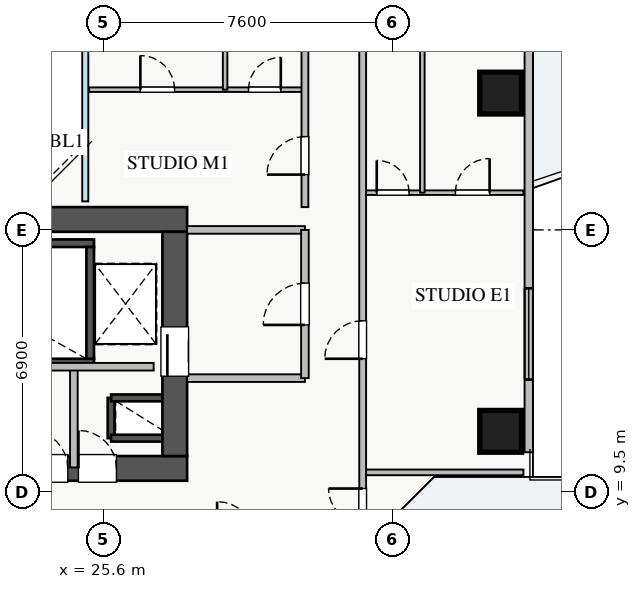
"""IFC4 building model, lengths in metres.
Left out: names, types, materials, properties, quantities, classifications, styles, units other than length and angle.
Written with IfcOpenShell. Run it as: python <this file> out.ifc"""

import sys

from ifc_helpers import new_model, si_unit, direction, frame, frame_2d, origin, origin_2d, place, context, subcontext, project, spatial, rectangle, extrude, source, transform, mapped, element, fill, save


model = new_model("IFC4")
c1 = context("Model", 3, precision=1e-05, world=origin(), true_north=direction((0.0, 1.0)))
c2 = subcontext(c1, "Body", "Model", "MODEL_VIEW")
j1 = project(units=[si_unit("LENGTHUNIT", "METRE"), si_unit("PLANEANGLEUNIT", "RADIAN")], contexts=[c1])
p1 = place(None, origin())
s1 = spatial("IfcSite", under=j1, at=p1, CompositionType="ELEMENT")
p2 = place(p1, origin())
s2 = spatial("IfcBuilding", under=s1, at=p2, CompositionType="ELEMENT")
p3 = place(p2, frame((0.0, 0.0, 113.25)))
s3 = spatial("IfcBuildingStorey", under=s2, at=p3, CompositionType="ELEMENT", Elevation=113.25)
p4 = place(p3, frame((25.8, 10.92, 0.0), z_axis=(0.0, 0.0, 1.0), x_axis=(0.0, 1.0, 0.0)))
e1 = element("IfcWall", 1, at=p4, inside=s3, PredefinedType="SHEAR", context=c2, shape_type="SweptSolid", body=[
    extrude(rectangle(XDim=1.06, YDim=0.18, at=frame_2d((0.53, 0.0))), origin(), (0.0, 0.0, 1.0), 3.07),
])
for number, where, z_axis, x_axis in (
    (2, (25.8, 11.98, 0.0), (0.0, 0.0, 1.0), (1.0, 0.0, 0.0)),
    (3, (25.8, 10.92, 0.0), (0.0, 0.0, 1.0), (1.0, 0.0, 0.0)),
):
    element("IfcWall", number, at=place(p3, frame(where, z_axis=z_axis, x_axis=x_axis)), inside=s3, PredefinedType="SHEAR", context=c2, shape_type="SweptSolid", body=[
        extrude(rectangle(XDim=1.35, YDim=0.18, at=frame_2d((0.675, 0.0))), origin(), (0.0, 0.0, 1.0), 3.07),
    ])
p5 = place(p3, frame((18.2, 12.91, 0.0), z_axis=(0.0, 0.0, 1.0), x_axis=(1.0, 0.0, 0.0)))
e4 = element("IfcWall", 4, at=p5, inside=s3, PredefinedType="SHEAR", context=c2, shape_type="SweptSolid", body=[
    extrude(rectangle(XDim=7.15, YDim=0.2, at=frame_2d((3.575, 0.0))), origin(), (0.0, 0.0, 1.0), 3.25),
])
p6 = place(p5, frame((0.35, 0.0, 0.0)))
e5 = element("IfcOpeningElement", 5, at=p6, cuts=e4, PredefinedType="OPENING", context=c2, shape_type="SweptSolid", body=[
    extrude(rectangle(XDim=1.1, YDim=2.05, at=frame_2d((0.55, 1.025))), frame((0.0, 0.11, 0.0), z_axis=(0.0, -1.0, 0.0), x_axis=(1.0, 0.0, 0.0)), (0.0, 0.0, 1.0), 0.22),
])
p7 = place(p3, frame((18.2, 16.05, 0.0), z_axis=(0.0, 0.0, 1.0), x_axis=(1.0, 0.0, 0.0)))
e6 = element("IfcWall", 6, at=p7, inside=s3, PredefinedType="SHEAR", context=c2, shape_type="SweptSolid", body=[
    extrude(rectangle(XDim=7.15, YDim=0.2, at=frame_2d((3.575, 0.0))), origin(), (0.0, 0.0, 1.0), 3.25),
])
p8 = place(p3, frame((25.25, 13.01, 0.0), z_axis=(0.0, 0.0, 1.0), x_axis=(0.0, 1.0, 0.0)))
e7 = element("IfcWall", 7, at=p8, inside=s3, PredefinedType="SHEAR", context=c2, shape_type="SweptSolid", body=[
    extrude(rectangle(XDim=2.94, YDim=0.2, at=frame_2d((1.47, 0.0))), origin(), (0.0, 0.0, 1.0), 3.25),
])
p9 = place(p3, frame((10.2, 10.125, 0.0), z_axis=(0.0, 0.0, 1.0), x_axis=(1.0, 0.0, 0.0)))
e8 = element("IfcWall", 8, at=p9, inside=s3, PredefinedType="SHEAR", context=c2, shape_type="SweptSolid", body=[
    extrude(rectangle(XDim=17.6, YDim=0.65, at=frame_2d((8.8, 0.0))), origin(), (0.0, 0.0, 1.0), 3.25),
])
p10 = place(p9, frame((1.15, 0.0, 0.0)))
e9 = element("IfcOpeningElement", 9, at=p10, cuts=e8, PredefinedType="OPENING", context=c2, shape_type="SweptSolid", body=[
    extrude(rectangle(XDim=1.1, YDim=2.05, at=frame_2d((0.55, 1.025))), frame((0.0, 0.335, 0.0), z_axis=(0.0, -1.0, 0.0), x_axis=(1.0, 0.0, 0.0)), (0.0, 0.0, 1.0), 0.67),
])
p11 = place(p9, frame((8.3, 0.0, 0.0)))
e10 = element("IfcOpeningElement", 10, at=p11, cuts=e8, PredefinedType="OPENING", context=c2, shape_type="SweptSolid", body=[
    extrude(rectangle(XDim=1.1, YDim=2.05, at=frame_2d((0.55, 1.025))), frame((0.0, 0.335, 0.0), z_axis=(0.0, -1.0, 0.0), x_axis=(1.0, 0.0, 0.0)), (0.0, 0.0, 1.0), 0.67),
])
p12 = place(p9, frame((4.9, 0.0, 0.0)))
e11 = element("IfcOpeningElement", 11, at=p12, cuts=e8, PredefinedType="OPENING", context=c2, shape_type="SweptSolid", body=[
    extrude(rectangle(XDim=1.1, YDim=2.05, at=frame_2d((0.55, 1.025))), frame((0.0, 0.335, 0.0), z_axis=(0.0, -1.0, 0.0), x_axis=(1.0, 0.0, 0.0)), (0.0, 0.0, 1.0), 0.67),
])
p13 = place(p9, frame((14.74, 0.0, 0.0)))
e12 = element("IfcOpeningElement", 12, at=p13, cuts=e8, PredefinedType="OPENING", context=c2, shape_type="SweptSolid", body=[
    extrude(rectangle(XDim=1.0, YDim=2.05, at=frame_2d((0.5, 1.025))), frame((0.0, 0.335, 0.0), z_axis=(0.0, -1.0, 0.0), x_axis=(1.0, 0.0, 0.0)), (0.0, 0.0, 1.0), 0.67),
])
p14 = place(p9, frame((10.155, 0.0, 0.0)))
e13 = element("IfcOpeningElement", 13, at=p14, cuts=e8, PredefinedType="OPENING", context=c2, shape_type="SweptSolid", body=[
    extrude(rectangle(XDim=1.0, YDim=2.05, at=frame_2d((0.5, 1.025))), frame((0.0, 0.335, 0.0), z_axis=(0.0, -1.0, 0.0), x_axis=(1.0, 0.0, 0.0)), (0.0, 0.0, 1.0), 0.67),
])
p15 = place(p9, frame((11.87, 0.0, 0.0)))
e14 = element("IfcOpeningElement", 14, at=p15, cuts=e8, PredefinedType="OPENING", context=c2, shape_type="SweptSolid", body=[
    extrude(rectangle(XDim=1.0, YDim=2.05, at=frame_2d((0.5, 1.025))), frame((0.0, 0.335, 0.0), z_axis=(0.0, -1.0, 0.0), x_axis=(1.0, 0.0, 0.0)), (0.0, 0.0, 1.0), 0.67),
])
p16 = place(p9, frame((13.46, 0.0, 0.0)))
e15 = element("IfcOpeningElement", 15, at=p16, cuts=e8, PredefinedType="OPENING", context=c2, shape_type="SweptSolid", body=[
    extrude(rectangle(XDim=1.0, YDim=2.05, at=frame_2d((0.5, 1.025))), frame((0.0, 0.335, 0.0), z_axis=(0.0, -1.0, 0.0), x_axis=(1.0, 0.0, 0.0)), (0.0, 0.0, 1.0), 0.67),
])
p17 = place(p3, frame((10.2, 16.675, 0.0), z_axis=(0.0, 0.0, 1.0), x_axis=(1.0, 0.0, 0.0)))
e16 = element("IfcWall", 16, at=p17, inside=s3, PredefinedType="SHEAR", context=c2, shape_type="SweptSolid", body=[
    extrude(rectangle(XDim=17.6, YDim=0.65, at=frame_2d((8.8, 0.0))), origin(), (0.0, 0.0, 1.0), 3.25),
])
p18 = place(p3, frame((27.475, 10.45, 0.0), z_axis=(0.0, 0.0, 1.0), x_axis=(0.0, 1.0, 0.0)))
e17 = element("IfcWall", 17, at=p18, inside=s3, PredefinedType="SHEAR", context=c2, shape_type="SweptSolid", body=[
    extrude(rectangle(XDim=5.9, YDim=0.65, at=frame_2d((2.95, 0.0))), origin(), (0.0, 0.0, 1.0), 3.25),
])
p19 = place(p18, frame((2.1, 0.0, 0.0)))
e18 = element("IfcOpeningElement", 18, at=p19, cuts=e17, PredefinedType="OPENING", context=c2, shape_type="SweptSolid", body=[
    extrude(rectangle(XDim=1.3, YDim=2.05, at=frame_2d((0.65, 1.025))), frame((0.0, 0.335, 0.0), z_axis=(0.0, -1.0, 0.0), x_axis=(1.0, 0.0, 0.0)), (0.0, 0.0, 1.0), 0.67),
])
m1 = source(origin(), c2, "Body", "SweptSolid", [
    extrude(rectangle(XDim=1.1, YDim=1.1, at=origin_2d()), origin(), (0.0, 0.0, 1.0), 3.25),
])
for number, where, z_axis, x_axis in (
    (19, (36.05, 11.1, 0.0), (0.0, 0.0, 1.0), (1.0, 0.0, 0.0)),
    (20, (36.05, 20.0, 0.0), (0.0, 0.0, 1.0), (1.0, 0.0, 0.0)),
):
    element("IfcColumn", number, at=place(p3, frame(where, z_axis=z_axis, x_axis=x_axis)), inside=s3, PredefinedType="COLUMN", context=c2, shape_type="MappedRepresentation", body=[
        mapped(m1, transform((0.0, 0.0, 0.0), x_axis=(1.0, 0.0, 0.0), y_axis=(0.0, 1.0, 0.0), z_axis=(0.0, 0.0, 1.0), scale=1.0)),
    ])
p20 = place(p3, frame((36.79, 10.55, 0.0), z_axis=(0.0, 0.0, 1.0), x_axis=(0.0, 1.0, 0.0)))
e21 = element("IfcWall", 21, at=p20, inside=s3, PredefinedType="STANDARD", context=c2, shape_type="SweptSolid", body=[
    extrude(rectangle(XDim=24.9, YDim=0.22, at=frame_2d((12.45, 0.0))), origin(), (0.0, 0.0, 1.0), 2.61),
])
p21 = place(p20, frame((13.3, 0.0, 0.0)))
e22 = element("IfcOpeningElement", 22, at=p21, cuts=e21, PredefinedType="OPENING", context=c2, shape_type="SweptSolid", body=[
    extrude(rectangle(XDim=1.2, YDim=2.1, at=frame_2d((0.6, 1.05))), frame((0.0, 0.12, 0.0), z_axis=(0.0, -1.0, 0.0), x_axis=(1.0, 0.0, 0.0)), (0.0, 0.0, 1.0), 0.24),
])
p22 = place(p20, frame((1.912, 0.0, 0.9)))
e23 = element("IfcOpeningElement", 23, at=p22, cuts=e21, PredefinedType="OPENING", context=c2, shape_type="SweptSolid", body=[
    extrude(rectangle(XDim=2.4, YDim=1.48, at=frame_2d((1.2, 0.74))), frame((0.0, 0.12, 0.0), z_axis=(0.0, -1.0, 0.0), x_axis=(1.0, 0.0, 0.0)), (0.0, 0.0, 1.0), 0.24),
])
p23 = place(p20, frame((20.737, 0.0, 0.9)))
e24 = element("IfcOpeningElement", 24, at=p23, cuts=e21, PredefinedType="OPENING", context=c2, shape_type="SweptSolid", body=[
    extrude(rectangle(XDim=2.1, YDim=1.48, at=frame_2d((1.05, 0.74))), frame((0.0, 0.12, 0.0), z_axis=(0.0, -1.0, 0.0), x_axis=(1.0, 0.0, 0.0)), (0.0, 0.0, 1.0), 0.24),
])
p24 = place(p20, frame((14.72, 0.0, 0.9)))
e25 = element("IfcOpeningElement", 25, at=p24, cuts=e21, PredefinedType="OPENING", context=c2, shape_type="SweptSolid", body=[
    extrude(rectangle(XDim=0.9, YDim=1.2, at=frame_2d((0.45, 0.6))), frame((0.0, 0.12, 0.0), z_axis=(0.0, -1.0, 0.0), x_axis=(1.0, 0.0, 0.0)), (0.0, 0.0, 1.0), 0.24),
])
for number, where, z_axis, x_axis in (
    (26, (27.8, 16.4, 0.0), (0.0, 0.0, 1.0), (1.0, 0.0, 0.0)),
    (27, (27.8, 12.5, 0.0), (0.0, 0.0, 1.0), (1.0, 0.0, 0.0)),
):
    element("IfcWall", number, at=place(p3, frame(where, z_axis=z_axis, x_axis=x_axis)), inside=s3, PredefinedType="PARTITIONING", context=c2, shape_type="SweptSolid", body=[
        extrude(rectangle(XDim=3.1, YDim=0.2, at=frame_2d((1.55, 0.0))), origin(), (0.0, 0.0, 1.0), 3.07),
    ])
p25 = place(p3, frame((30.9, 12.5, 0.0), z_axis=(0.0, 0.0, 1.0), x_axis=(0.0, 1.0, 0.0)))
e28 = element("IfcWall", 28, at=p25, inside=s3, PredefinedType="PARTITIONING", context=c2, shape_type="SweptSolid", body=[
    extrude(rectangle(XDim=3.9, YDim=0.2, at=frame_2d((1.95, 0.0))), origin(), (0.0, 0.0, 1.0), 3.07),
])
p26 = place(p25, frame((1.4, 0.0, 0.0)))
e29 = element("IfcOpeningElement", 29, at=p26, cuts=e28, PredefinedType="OPENING", context=c2, shape_type="SweptSolid", body=[
    extrude(rectangle(XDim=1.1, YDim=2.05, at=frame_2d((0.55, 1.025))), frame((0.0, 0.11, 0.0), z_axis=(0.0, -1.0, 0.0), x_axis=(1.0, 0.0, 0.0)), (0.0, 0.0, 1.0), 0.22),
])
p27 = place(p3, frame((24.82, 10.15, 0.0), z_axis=(0.0, 0.0, 1.0), x_axis=(0.0, 1.0, 0.0)))
e30 = element("IfcWall", 30, at=p27, inside=s3, PredefinedType="PARTITIONING", context=c2, shape_type="SweptSolid", body=[
    extrude(rectangle(XDim=2.65, YDim=0.2, at=frame_2d((1.325, 0.0))), origin(), (0.0, 0.0, 1.0), 3.07),
])
p28 = place(p3, frame((21.75, 12.8, 0.0), z_axis=(0.0, 0.0, 1.0), x_axis=(1.0, 0.0, 0.0)))
e31 = element("IfcWall", 31, at=p28, inside=s3, PredefinedType="PARTITIONING", context=c2, shape_type="SweptSolid", body=[
    extrude(rectangle(XDim=5.17, YDim=0.2, at=frame_2d((2.585, 0.0))), origin(), (0.0, 0.0, 1.0), 3.07),
])
p29 = place(p3, frame((32.42, 10.02, 0.0), z_axis=(0.0, 0.0, 1.0), x_axis=(1.0, 0.0, 0.0)))
e32 = element("IfcWall", 32, at=p29, inside=s3, PredefinedType="PARTITIONING", context=c2, shape_type="SweptSolid", body=[
    extrude(rectangle(XDim=4.23, YDim=0.15, at=frame_2d((2.115, 0.0))), origin(), (0.0, 0.0, 1.0), 3.07),
])
p30 = place(p3, frame((32.42, 17.38, 0.0), z_axis=(0.0, 0.0, 1.0), x_axis=(1.0, 0.0, 0.0)))
e33 = element("IfcWall", 33, at=p30, inside=s3, PredefinedType="PLUMBINGWALL", context=c2, shape_type="SweptSolid", body=[
    extrude(rectangle(XDim=4.23, YDim=0.12, at=frame_2d((2.115, 0.0))), origin(), (0.0, 0.0, 1.0), 3.07),
])
p31 = place(p30, frame((0.37, 0.0, 0.0)))
e34 = element("IfcOpeningElement", 34, at=p31, cuts=e33, PredefinedType="OPENING", context=c2, shape_type="SweptSolid", body=[
    extrude(rectangle(XDim=0.85, YDim=2.05, at=frame_2d((0.425, 1.025))), frame((0.0, 0.07, 0.0), z_axis=(0.0, -1.0, 0.0), x_axis=(1.0, 0.0, 0.0)), (0.0, 0.0, 1.0), 0.14),
])
p32 = place(p30, frame((2.44, 0.0, 0.0)))
e35 = element("IfcOpeningElement", 35, at=p32, cuts=e33, PredefinedType="OPENING", context=c2, shape_type="SweptSolid", body=[
    extrude(rectangle(XDim=0.9, YDim=2.05, at=frame_2d((0.45, 1.025))), frame((0.0, 0.07, 0.0), z_axis=(0.0, -1.0, 0.0), x_axis=(1.0, 0.0, 0.0)), (0.0, 0.0, 1.0), 0.14),
])
p33 = place(p3, frame((33.99, 17.38, 0.0), z_axis=(0.0, 0.0, 1.0), x_axis=(0.0, 1.0, 0.0)))
e36 = element("IfcWall", 36, at=p33, inside=s3, PredefinedType="PLUMBINGWALL", context=c2, shape_type="SweptSolid", body=[
    extrude(rectangle(XDim=6.27, YDim=0.12, at=frame_2d((3.135, 0.0))), origin(), (0.0, 0.0, 1.0), 3.07),
])
p34 = place(p3, frame((32.42, 8.25, 0.0), z_axis=(0.0, 0.0, 1.0), x_axis=(0.0, 1.0, 0.0)))
e37 = element("IfcWall", 37, at=p34, inside=s3, PredefinedType="PARTITIONING", context=c2, shape_type="SweptSolid", body=[
    extrude(rectangle(XDim=29.5, YDim=0.18, at=frame_2d((14.75, 0.0))), origin(), (0.0, 0.0, 1.0), 3.07),
])
p35 = place(p34, frame((28.155, 0.0, 0.0)))
e38 = element("IfcOpeningElement", 38, at=p35, cuts=e37, PredefinedType="OPENING", context=c2, shape_type="SweptSolid", body=[
    extrude(rectangle(XDim=0.9, YDim=2.05, at=frame_2d((0.45, 1.025))), frame((0.0, 0.1, 0.0), z_axis=(0.0, -1.0, 0.0), x_axis=(1.0, 0.0, 0.0)), (0.0, 0.0, 1.0), 0.2),
])
p36 = place(p34, frame((0.445, 0.0, 0.0)))
e39 = element("IfcOpeningElement", 39, at=p36, cuts=e37, PredefinedType="OPENING", context=c2, shape_type="SweptSolid", body=[
    extrude(rectangle(XDim=0.9, YDim=2.05, at=frame_2d((0.45, 1.025))), frame((0.0, 0.1, 0.0), z_axis=(0.0, -1.0, 0.0), x_axis=(1.0, 0.0, 0.0)), (0.0, 0.0, 1.0), 0.2),
])
p37 = place(p34, frame((4.76, 0.0, 0.0)))
e40 = element("IfcOpeningElement", 40, at=p37, cuts=e37, PredefinedType="OPENING", context=c2, shape_type="SweptSolid", body=[
    extrude(rectangle(XDim=1.0, YDim=2.05, at=frame_2d((0.5, 1.025))), frame((0.0, 0.1, 0.0), z_axis=(0.0, -1.0, 0.0), x_axis=(1.0, 0.0, 0.0)), (0.0, 0.0, 1.0), 0.2),
])
p38 = place(p34, frame((18.04, 0.0, 0.0)))
e41 = element("IfcOpeningElement", 41, at=p38, cuts=e37, PredefinedType="OPENING", context=c2, shape_type="SweptSolid", body=[
    extrude(rectangle(XDim=1.0, YDim=2.05, at=frame_2d((0.5, 1.025))), frame((0.0, 0.1, 0.0), z_axis=(0.0, -1.0, 0.0), x_axis=(1.0, 0.0, 0.0)), (0.0, 0.0, 1.0), 0.2),
])
p39 = place(p3, frame((25.22, 20.09, 0.0), z_axis=(0.0, 0.0, 1.0), x_axis=(1.0, 0.0, 0.0)))
e42 = element("IfcWall", 42, at=p39, inside=s3, PredefinedType="PLUMBINGWALL", context=c2, shape_type="SweptSolid", body=[
    extrude(rectangle(XDim=5.68, YDim=0.12, at=frame_2d((2.84, 0.0))), origin(), (0.0, 0.0, 1.0), 2.625),
])
p40 = place(p39, frame((1.35, 0.0, 0.0)))
e43 = element("IfcOpeningElement", 43, at=p40, cuts=e42, PredefinedType="OPENING", context=c2, shape_type="SweptSolid", body=[
    extrude(rectangle(XDim=0.9, YDim=2.05, at=frame_2d((0.45, 1.025))), frame((0.0, 0.07, 0.0), z_axis=(0.0, -1.0, 0.0), x_axis=(1.0, 0.0, 0.0)), (0.0, 0.0, 1.0), 0.14),
])
p41 = place(p39, frame((4.195, 0.0, 0.0)))
e44 = element("IfcOpeningElement", 44, at=p41, cuts=e42, PredefinedType="OPENING", context=c2, shape_type="SweptSolid", body=[
    extrude(rectangle(XDim=0.85, YDim=2.05, at=frame_2d((0.425, 1.025))), frame((0.0, 0.07, 0.0), z_axis=(0.0, -1.0, 0.0), x_axis=(1.0, 0.0, 0.0)), (0.0, 0.0, 1.0), 0.14),
])
p42 = place(p3, frame((28.8, 20.09, 0.0), z_axis=(0.0, 0.0, 1.0), x_axis=(0.0, 1.0, 0.0)))
e45 = element("IfcWall", 45, at=p42, inside=s3, PredefinedType="PLUMBINGWALL", context=c2, shape_type="SweptSolid", body=[
    extrude(rectangle(XDim=2.63, YDim=0.12, at=frame_2d((1.315, 0.0))), origin(), (0.0, 0.0, 1.0), 3.07),
])
p43 = place(p3, frame((30.9, 17.0, 0.0), z_axis=(0.0, 0.0, 1.0), x_axis=(0.0, 1.0, 0.0)))
e46 = element("IfcWall", 46, at=p43, inside=s3, PredefinedType="PARTITIONING", context=c2, shape_type="SweptSolid", body=[
    extrude(rectangle(XDim=12.0, YDim=0.18, at=frame_2d((6.0, 0.0))), origin(), (0.0, 0.0, 1.0), 3.07),
])
p44 = place(p43, frame((0.855, 0.0, 0.0)))
e47 = element("IfcOpeningElement", 47, at=p44, cuts=e46, PredefinedType="OPENING", context=c2, shape_type="SweptSolid", body=[
    extrude(rectangle(XDim=1.0, YDim=2.05, at=frame_2d((0.5, 1.025))), frame((0.0, 0.1, 0.0), z_axis=(0.0, -1.0, 0.0), x_axis=(1.0, 0.0, 0.0)), (0.0, 0.0, 1.0), 0.2),
])
p45 = place(p43, frame((6.725, 0.0, 0.0)))
e48 = element("IfcOpeningElement", 48, at=p45, cuts=e46, PredefinedType="OPENING", context=c2, shape_type="SweptSolid", body=[
    extrude(rectangle(XDim=1.0, YDim=2.05, at=frame_2d((0.5, 1.025))), frame((0.0, 0.1, 0.0), z_axis=(0.0, -1.0, 0.0), x_axis=(1.0, 0.0, 0.0)), (0.0, 0.0, 1.0), 0.2),
])
m2 = source(origin(), c2, "Body", "SweptSolid", [
    extrude(rectangle(XDim=2.4, YDim=1.48, at=frame_2d((1.2, 0.74))), frame((0.0, 0.03, 0.0), z_axis=(0.0, -1.0, 0.0), x_axis=(1.0, 0.0, 0.0)), (0.0, 0.0, 1.0), 0.06),
])
p46 = place(p22, origin())
e49 = element("IfcWindow", 49, at=p46, inside=s3, PartitioningType="TRIPLE_PANEL_VERTICAL", PredefinedType="WINDOW", context=c2, shape_type="MappedRepresentation", body=[
    mapped(m2, transform((0.0, 0.0, 0.0), x_axis=(1.0, 0.0, 0.0), y_axis=(0.0, 1.0, 0.0), z_axis=(0.0, 0.0, 1.0), scale=1.0)),
])
fill(e23, e49)
m3 = source(origin(), c2, "Body", "SweptSolid", [
    extrude(rectangle(XDim=1.3, YDim=2.05, at=frame_2d((0.65, 1.025))), frame((0.0, 0.025, 0.0), z_axis=(0.0, -1.0, 0.0), x_axis=(1.0, 0.0, 0.0)), (0.0, 0.0, 1.0), 0.05),
])
p47 = place(p19, origin())
e50 = element("IfcDoor", 50, at=p47, inside=s3, OperationType="SLIDING_TO_RIGHT", PredefinedType="DOOR", context=c2, shape_type="MappedRepresentation", body=[
    mapped(m3, transform((0.0, 0.0, 0.0), x_axis=(1.0, 0.0, 0.0), y_axis=(0.0, 1.0, 0.0), z_axis=(0.0, 0.0, 1.0), scale=1.0)),
])
fill(e18, e50)
m4 = source(origin(), c2, "Body", "SweptSolid", [
    extrude(rectangle(XDim=1.0, YDim=2.05, at=frame_2d((0.5, 1.025))), frame((0.0, 0.025, 0.0), z_axis=(0.0, -1.0, 0.0), x_axis=(1.0, 0.0, 0.0)), (0.0, 0.0, 1.0), 0.05),
])
p48 = place(p13, origin())
e51 = element("IfcDoor", 51, at=p48, inside=s3, OperationType="SINGLE_SWING_LEFT", PredefinedType="DOOR", context=c2, shape_type="MappedRepresentation", body=[
    mapped(m4, transform((0.0, 0.0, 0.0), x_axis=(1.0, 0.0, 0.0), y_axis=(0.0, 1.0, 0.0), z_axis=(0.0, 0.0, 1.0), scale=1.0)),
])
fill(e12, e51)
p49 = place(p16, origin())
e52 = element("IfcDoor", 52, at=p49, inside=s3, OperationType="SINGLE_SWING_LEFT", PredefinedType="DOOR", context=c2, shape_type="MappedRepresentation", body=[
    mapped(m4, transform((0.0, 0.0, 0.0), x_axis=(1.0, 0.0, 0.0), y_axis=(0.0, 1.0, 0.0), z_axis=(0.0, 0.0, 1.0), scale=1.0)),
])
fill(e15, e52)
m5 = source(origin(), c2, "Body", "SweptSolid", [
    extrude(rectangle(XDim=1.1, YDim=2.05, at=frame_2d((0.55, 1.025))), frame((0.0, 0.025, 0.0), z_axis=(0.0, -1.0, 0.0), x_axis=(1.0, 0.0, 0.0)), (0.0, 0.0, 1.0), 0.05),
])
p50 = place(p26, origin())
e53 = element("IfcDoor", 53, at=p50, inside=s3, OperationType="SINGLE_SWING_LEFT", PredefinedType="DOOR", context=c2, shape_type="MappedRepresentation", body=[
    mapped(m5, transform((0.0, 0.0, 0.0), x_axis=(1.0, 0.0, 0.0), y_axis=(0.0, 1.0, 0.0), z_axis=(0.0, 0.0, 1.0), scale=1.0)),
])
fill(e29, e53)
m6 = source(origin(), c2, "Body", "SweptSolid", [
    extrude(rectangle(XDim=0.85, YDim=2.05, at=frame_2d((0.425, 1.025))), frame((0.0, 0.025, 0.0), z_axis=(0.0, -1.0, 0.0), x_axis=(1.0, 0.0, 0.0)), (0.0, 0.0, 1.0), 0.05),
])
p51 = place(p31, origin())
e54 = element("IfcDoor", 54, at=p51, inside=s3, OperationType="SINGLE_SWING_LEFT", PredefinedType="DOOR", context=c2, shape_type="MappedRepresentation", body=[
    mapped(m6, transform((0.0, 0.0, 0.0), x_axis=(1.0, 0.0, 0.0), y_axis=(0.0, 1.0, 0.0), z_axis=(0.0, 0.0, 1.0), scale=1.0)),
])
fill(e34, e54)
m7 = source(origin(), c2, "Body", "SweptSolid", [
    extrude(rectangle(XDim=0.9, YDim=2.05, at=frame_2d((0.45, 1.025))), frame((0.0, 0.025, 0.0), z_axis=(0.0, -1.0, 0.0), x_axis=(1.0, 0.0, 0.0)), (0.0, 0.0, 1.0), 0.05),
])
p52 = place(p32, origin())
e55 = element("IfcDoor", 55, at=p52, inside=s3, OperationType="SINGLE_SWING_RIGHT", PredefinedType="DOOR", context=c2, shape_type="MappedRepresentation", body=[
    mapped(m7, transform((0.0, 0.0, 0.0), x_axis=(1.0, 0.0, 0.0), y_axis=(0.0, 1.0, 0.0), z_axis=(0.0, 0.0, 1.0), scale=1.0)),
])
fill(e35, e55)
p53 = place(p36, origin())
e56 = element("IfcDoor", 56, at=p53, inside=s3, OperationType="SINGLE_SWING_RIGHT", PredefinedType="DOOR", context=c2, shape_type="MappedRepresentation", body=[
    mapped(m7, transform((0.0, 0.0, 0.0), x_axis=(1.0, 0.0, 0.0), y_axis=(0.0, 1.0, 0.0), z_axis=(0.0, 0.0, 1.0), scale=1.0)),
])
fill(e39, e56)
p54 = place(p37, origin())
e57 = element("IfcDoor", 57, at=p54, inside=s3, OperationType="SINGLE_SWING_LEFT", PredefinedType="DOOR", context=c2, shape_type="MappedRepresentation", body=[
    mapped(m4, transform((0.0, 0.0, 0.0), x_axis=(1.0, 0.0, 0.0), y_axis=(0.0, 1.0, 0.0), z_axis=(0.0, 0.0, 1.0), scale=1.0)),
])
fill(e40, e57)
p55 = place(p40, origin())
e58 = element("IfcDoor", 58, at=p55, inside=s3, OperationType="SINGLE_SWING_LEFT", PredefinedType="DOOR", context=c2, shape_type="MappedRepresentation", body=[
    mapped(m7, transform((0.0, 0.0, 0.0), x_axis=(1.0, 0.0, 0.0), y_axis=(0.0, 1.0, 0.0), z_axis=(0.0, 0.0, 1.0), scale=1.0)),
])
fill(e43, e58)
p56 = place(p41, origin())
e59 = element("IfcDoor", 59, at=p56, inside=s3, OperationType="SINGLE_SWING_RIGHT", PredefinedType="DOOR", context=c2, shape_type="MappedRepresentation", body=[
    mapped(m6, transform((0.0, 0.0, 0.0), x_axis=(1.0, 0.0, 0.0), y_axis=(0.0, 1.0, 0.0), z_axis=(0.0, 0.0, 1.0), scale=1.0)),
])
fill(e44, e59)
p57 = place(p44, origin())
e60 = element("IfcDoor", 60, at=p57, inside=s3, OperationType="SINGLE_SWING_LEFT", PredefinedType="DOOR", context=c2, shape_type="MappedRepresentation", body=[
    mapped(m4, transform((0.0, 0.0, 0.0), x_axis=(1.0, 0.0, 0.0), y_axis=(0.0, 1.0, 0.0), z_axis=(0.0, 0.0, 1.0), scale=1.0)),
])
fill(e47, e60)
save(model, sys.argv[1])
